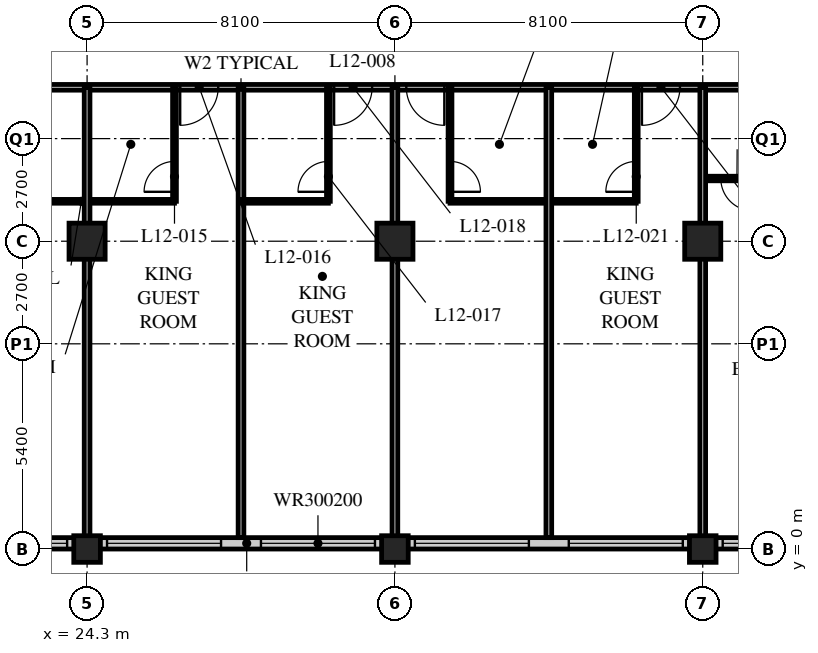
"""IFC4 building model, lengths in metres.
Left out: names, types, materials, properties, quantities, classifications, styles, units other than length and angle.
Written with IfcOpenShell. Run it as: python <this file> out.ifc"""

import sys

from ifc_helpers import new_model, si_unit, direction, frame, frame_2d, origin, origin_2d, place, context, subcontext, project, spatial, rectangle, hollow_rectangle, extrude, element, fill, save


model = new_model("IFC4")
c1 = context("Model", 3, precision=1e-05, world=origin(), true_north=direction((0.0, 1.0)))
c2 = subcontext(c1, "Body", "Model", "MODEL_VIEW")
j1 = project(units=[si_unit("LENGTHUNIT", "METRE"), si_unit("PLANEANGLEUNIT", "RADIAN")], contexts=[c1])
p1 = place(None, origin())
s1 = spatial("IfcSite", under=j1, at=p1, CompositionType="ELEMENT")
p2 = place(p1, origin())
s2 = spatial("IfcBuilding", under=s1, at=p2, CompositionType="ELEMENT")
p3 = place(p2, frame((0.0, 0.0, 53.4)))
s3 = spatial("IfcBuildingStorey", under=s2, at=p3, CompositionType="ELEMENT", Elevation=53.4)
p4 = place(p3, frame((24.3, 0.0, 0.0), z_axis=(0.0, 0.0, 1.0), x_axis=(1.0, 0.0, 0.0)))
e1 = element("IfcColumn", 1, at=p4, inside=s3, PredefinedType="COLUMN", context=c2, shape_type="SweptSolid", body=[
    extrude(hollow_rectangle(XDim=0.7, YDim=0.7, WallThickness=0.06, at=origin_2d()), origin(), (0.0, 0.0, 1.0), 3.4),
])
p5 = place(p3, frame((24.3, 8.1, 0.0), z_axis=(0.0, 0.0, 1.0), x_axis=(1.0, 0.0, 0.0)))
e2 = element("IfcColumn", 2, at=p5, inside=s3, PredefinedType="COLUMN", context=c2, shape_type="SweptSolid", body=[
    extrude(hollow_rectangle(XDim=0.95, YDim=0.95, WallThickness=0.095, at=origin_2d()), origin(), (0.0, 0.0, 1.0), 3.4),
])
p6 = place(p3, frame((32.4, 0.0, 0.0), z_axis=(0.0, 0.0, 1.0), x_axis=(1.0, 0.0, 0.0)))
e3 = element("IfcColumn", 3, at=p6, inside=s3, PredefinedType="COLUMN", context=c2, shape_type="SweptSolid", body=[
    extrude(hollow_rectangle(XDim=0.7, YDim=0.7, WallThickness=0.06, at=origin_2d()), origin(), (0.0, 0.0, 1.0), 3.4),
])
p7 = place(p3, frame((32.4, 8.1, 0.0), z_axis=(0.0, 0.0, 1.0), x_axis=(1.0, 0.0, 0.0)))
e4 = element("IfcColumn", 4, at=p7, inside=s3, PredefinedType="COLUMN", context=c2, shape_type="SweptSolid", body=[
    extrude(hollow_rectangle(XDim=0.95, YDim=0.95, WallThickness=0.095, at=origin_2d()), origin(), (0.0, 0.0, 1.0), 3.4),
])
p8 = place(p3, frame((40.5, 0.0, 0.0), z_axis=(0.0, 0.0, 1.0), x_axis=(1.0, 0.0, 0.0)))
e5 = element("IfcColumn", 5, at=p8, inside=s3, PredefinedType="COLUMN", context=c2, shape_type="SweptSolid", body=[
    extrude(hollow_rectangle(XDim=0.7, YDim=0.7, WallThickness=0.06, at=origin_2d()), origin(), (0.0, 0.0, 1.0), 3.4),
])
p9 = place(p3, frame((40.5, 8.1, 0.0), z_axis=(0.0, 0.0, 1.0), x_axis=(1.0, 0.0, 0.0)))
e6 = element("IfcColumn", 6, at=p9, inside=s3, PredefinedType="COLUMN", context=c2, shape_type="SweptSolid", body=[
    extrude(hollow_rectangle(XDim=0.95, YDim=0.95, WallThickness=0.095, at=origin_2d()), origin(), (0.0, 0.0, 1.0), 3.4),
])
p10 = place(p3, frame((8.4, 0.15, 0.0), z_axis=(0.0, 0.0, 1.0), x_axis=(1.0, 0.0, 0.0)))
e7 = element("IfcWall", 7, at=p10, inside=s3, PredefinedType="SOLIDWALL", context=c2, shape_type="SweptSolid", body=[
    extrude(rectangle(XDim=40.2, YDim=0.3, at=frame_2d((20.1, 0.0))), origin(), (0.0, 0.0, 1.0), 3.19),
])
p11 = place(p10, frame((0.225, 0.0, 0.9)))
e8 = element("IfcOpeningElement", 8, at=p11, cuts=e7, PredefinedType="OPENING", context=c2, shape_type="SweptSolid", body=[
    extrude(rectangle(XDim=3.0, YDim=2.0, at=frame_2d((1.5, 1.0))), frame((0.0, 0.16, 0.0), z_axis=(0.0, -1.0, 0.0), x_axis=(1.0, 0.0, 0.0)), (0.0, 0.0, 1.0), 0.32),
])
p12 = place(p10, frame((4.275, 0.0, 0.9)))
e9 = element("IfcOpeningElement", 9, at=p12, cuts=e7, PredefinedType="OPENING", context=c2, shape_type="SweptSolid", body=[
    extrude(rectangle(XDim=3.0, YDim=2.0, at=frame_2d((1.5, 1.0))), frame((0.0, 0.16, 0.0), z_axis=(0.0, -1.0, 0.0), x_axis=(1.0, 0.0, 0.0)), (0.0, 0.0, 1.0), 0.32),
])
p13 = place(p10, frame((8.325, 0.0, 0.9)))
e10 = element("IfcOpeningElement", 10, at=p13, cuts=e7, PredefinedType="OPENING", context=c2, shape_type="SweptSolid", body=[
    extrude(rectangle(XDim=3.0, YDim=2.0, at=frame_2d((1.5, 1.0))), frame((0.0, 0.16, 0.0), z_axis=(0.0, -1.0, 0.0), x_axis=(1.0, 0.0, 0.0)), (0.0, 0.0, 1.0), 0.32),
])
p14 = place(p10, frame((12.375, 0.0, 0.9)))
e11 = element("IfcOpeningElement", 11, at=p14, cuts=e7, PredefinedType="OPENING", context=c2, shape_type="SweptSolid", body=[
    extrude(rectangle(XDim=3.0, YDim=2.0, at=frame_2d((1.5, 1.0))), frame((0.0, 0.16, 0.0), z_axis=(0.0, -1.0, 0.0), x_axis=(1.0, 0.0, 0.0)), (0.0, 0.0, 1.0), 0.32),
])
p15 = place(p10, frame((16.425, 0.0, 0.9)))
e12 = element("IfcOpeningElement", 12, at=p15, cuts=e7, PredefinedType="OPENING", context=c2, shape_type="SweptSolid", body=[
    extrude(rectangle(XDim=3.0, YDim=2.0, at=frame_2d((1.5, 1.0))), frame((0.0, 0.16, 0.0), z_axis=(0.0, -1.0, 0.0), x_axis=(1.0, 0.0, 0.0)), (0.0, 0.0, 1.0), 0.32),
])
p16 = place(p10, frame((20.475, 0.0, 0.9)))
e13 = element("IfcOpeningElement", 13, at=p16, cuts=e7, PredefinedType="OPENING", context=c2, shape_type="SweptSolid", body=[
    extrude(rectangle(XDim=3.0, YDim=2.0, at=frame_2d((1.5, 1.0))), frame((0.0, 0.16, 0.0), z_axis=(0.0, -1.0, 0.0), x_axis=(1.0, 0.0, 0.0)), (0.0, 0.0, 1.0), 0.32),
])
p17 = place(p10, frame((24.525, 0.0, 0.9)))
e14 = element("IfcOpeningElement", 14, at=p17, cuts=e7, PredefinedType="OPENING", context=c2, shape_type="SweptSolid", body=[
    extrude(rectangle(XDim=3.0, YDim=2.0, at=frame_2d((1.5, 1.0))), frame((0.0, 0.16, 0.0), z_axis=(0.0, -1.0, 0.0), x_axis=(1.0, 0.0, 0.0)), (0.0, 0.0, 1.0), 0.32),
])
p18 = place(p10, frame((28.575, 0.0, 0.9)))
e15 = element("IfcOpeningElement", 15, at=p18, cuts=e7, PredefinedType="OPENING", context=c2, shape_type="SweptSolid", body=[
    extrude(rectangle(XDim=3.0, YDim=2.0, at=frame_2d((1.5, 1.0))), frame((0.0, 0.16, 0.0), z_axis=(0.0, -1.0, 0.0), x_axis=(1.0, 0.0, 0.0)), (0.0, 0.0, 1.0), 0.32),
])
p19 = place(p10, frame((32.625, 0.0, 0.9)))
e16 = element("IfcOpeningElement", 16, at=p19, cuts=e7, PredefinedType="OPENING", context=c2, shape_type="SweptSolid", body=[
    extrude(rectangle(XDim=3.0, YDim=2.0, at=frame_2d((1.5, 1.0))), frame((0.0, 0.16, 0.0), z_axis=(0.0, -1.0, 0.0), x_axis=(1.0, 0.0, 0.0)), (0.0, 0.0, 1.0), 0.32),
])
p20 = place(p10, frame((36.675, 0.0, 0.9)))
e17 = element("IfcOpeningElement", 17, at=p20, cuts=e7, PredefinedType="OPENING", context=c2, shape_type="SweptSolid", body=[
    extrude(rectangle(XDim=3.0, YDim=2.0, at=frame_2d((1.5, 1.0))), frame((0.0, 0.16, 0.0), z_axis=(0.0, -1.0, 0.0), x_axis=(1.0, 0.0, 0.0)), (0.0, 0.0, 1.0), 0.32),
])
p21 = place(p3, frame((12.15, 12.15, 0.0), z_axis=(0.0, 0.0, 1.0), x_axis=(1.0, 0.0, 0.0)))
e18 = element("IfcWall", 18, at=p21, inside=s3, PredefinedType="PARTITIONING", context=c2, shape_type="SweptSolid", body=[
    extrude(rectangle(XDim=32.4, YDim=0.15, at=frame_2d((16.2, 0.0))), origin(), (0.0, 0.0, 1.0), 3.19),
])
p22 = place(p21, frame((6.5, 0.0, 0.0)))
e19 = element("IfcOpeningElement", 19, at=p22, cuts=e18, PredefinedType="OPENING", context=c2, shape_type="SweptSolid", body=[
    extrude(rectangle(XDim=1.0, YDim=2.1, at=frame_2d((0.5, 1.05))), frame((0.0, 0.085, 0.0), z_axis=(0.0, -1.0, 0.0), x_axis=(1.0, 0.0, 0.0)), (0.0, 0.0, 1.0), 0.17),
])
p23 = place(p21, frame((8.4, 0.0, 0.0)))
e20 = element("IfcOpeningElement", 20, at=p23, cuts=e18, PredefinedType="OPENING", context=c2, shape_type="SweptSolid", body=[
    extrude(rectangle(XDim=1.0, YDim=2.1, at=frame_2d((0.5, 1.05))), frame((0.0, 0.085, 0.0), z_axis=(0.0, -1.0, 0.0), x_axis=(1.0, 0.0, 0.0)), (0.0, 0.0, 1.0), 0.17),
])
p24 = place(p21, frame((14.6, 0.0, 0.0)))
e21 = element("IfcOpeningElement", 21, at=p24, cuts=e18, PredefinedType="OPENING", context=c2, shape_type="SweptSolid", body=[
    extrude(rectangle(XDim=1.0, YDim=2.1, at=frame_2d((0.5, 1.05))), frame((0.0, 0.085, 0.0), z_axis=(0.0, -1.0, 0.0), x_axis=(1.0, 0.0, 0.0)), (0.0, 0.0, 1.0), 0.17),
])
p25 = place(p21, frame((18.65, 0.0, 0.0)))
e22 = element("IfcOpeningElement", 22, at=p25, cuts=e18, PredefinedType="OPENING", context=c2, shape_type="SweptSolid", body=[
    extrude(rectangle(XDim=1.0, YDim=2.1, at=frame_2d((0.5, 1.05))), frame((0.0, 0.085, 0.0), z_axis=(0.0, -1.0, 0.0), x_axis=(1.0, 0.0, 0.0)), (0.0, 0.0, 1.0), 0.17),
])
p26 = place(p21, frame((20.55, 0.0, 0.0)))
e23 = element("IfcOpeningElement", 23, at=p26, cuts=e18, PredefinedType="OPENING", context=c2, shape_type="SweptSolid", body=[
    extrude(rectangle(XDim=1.0, YDim=2.1, at=frame_2d((0.5, 1.05))), frame((0.0, 0.085, 0.0), z_axis=(0.0, -1.0, 0.0), x_axis=(1.0, 0.0, 0.0)), (0.0, 0.0, 1.0), 0.17),
])
p27 = place(p21, frame((26.75, 0.0, 0.0)))
e24 = element("IfcOpeningElement", 24, at=p27, cuts=e18, PredefinedType="OPENING", context=c2, shape_type="SweptSolid", body=[
    extrude(rectangle(XDim=1.0, YDim=2.1, at=frame_2d((0.5, 1.05))), frame((0.0, 0.085, 0.0), z_axis=(0.0, -1.0, 0.0), x_axis=(1.0, 0.0, 0.0)), (0.0, 0.0, 1.0), 0.17),
])
p28 = place(p21, frame((1.525, 0.0, 0.0)))
e25 = element("IfcOpeningElement", 25, at=p28, cuts=e18, PredefinedType="OPENING", context=c2, shape_type="SweptSolid", body=[
    extrude(rectangle(XDim=1.0, YDim=2.1, at=frame_2d((0.5, 1.05))), frame((0.0, 0.085, 0.0), z_axis=(0.0, -1.0, 0.0), x_axis=(1.0, 0.0, 0.0)), (0.0, 0.0, 1.0), 0.17),
])
p29 = place(p21, frame((29.875, 0.0, 0.0)))
e26 = element("IfcOpeningElement", 26, at=p29, cuts=e18, PredefinedType="OPENING", context=c2, shape_type="SweptSolid", body=[
    extrude(rectangle(XDim=1.0, YDim=2.1, at=frame_2d((0.5, 1.05))), frame((0.0, 0.085, 0.0), z_axis=(0.0, -1.0, 0.0), x_axis=(1.0, 0.0, 0.0)), (0.0, 0.0, 1.0), 0.17),
])
p30 = place(p3, frame((21.7, 9.15, 0.0), z_axis=(0.0, 0.0, 1.0), x_axis=(1.0, 0.0, 0.0)))
e27 = element("IfcWall", 27, at=p30, inside=s3, PredefinedType="PARTITIONING", context=c2, shape_type="SweptSolid", body=[
    extrude(rectangle(XDim=4.9, YDim=0.1, at=frame_2d((2.45, 0.0))), origin(), (0.0, 0.0, 1.0), 3.19),
])
p31 = place(p3, frame((24.3, 12.15, 0.0), z_axis=(0.0, 0.0, 1.0), x_axis=(0.0, -1.0, 0.0)))
e28 = element("IfcWall", 28, at=p31, inside=s3, PredefinedType="PARTITIONING", context=c2, shape_type="SweptSolid", body=[
    extrude(rectangle(XDim=11.85, YDim=0.15, at=frame_2d((5.925, 0.0))), origin(), (0.0, 0.0, 1.0), 2.578),
])
p32 = place(p3, frame((26.6, 12.15, 0.0), z_axis=(0.0, 0.0, 1.0), x_axis=(0.0, -1.0, 0.0)))
e29 = element("IfcWall", 29, at=p32, inside=s3, PredefinedType="PARTITIONING", context=c2, shape_type="SweptSolid", body=[
    extrude(rectangle(XDim=3.0, YDim=0.1, at=frame_2d((1.5, 0.0))), origin(), (0.0, 0.0, 1.0), 3.19),
])
p33 = place(p32, frame((1.95, 0.0, 0.0)))
e30 = element("IfcOpeningElement", 30, at=p33, cuts=e29, PredefinedType="OPENING", context=c2, shape_type="SweptSolid", body=[
    extrude(rectangle(XDim=0.8, YDim=2.1, at=frame_2d((0.4, 1.05))), frame((0.0, 0.06, 0.0), z_axis=(0.0, -1.0, 0.0), x_axis=(1.0, 0.0, 0.0)), (0.0, 0.0, 1.0), 0.12),
])
p34 = place(p3, frame((28.35, 12.15, 0.0), z_axis=(0.0, 0.0, 1.0), x_axis=(0.0, -1.0, 0.0)))
e31 = element("IfcWall", 31, at=p34, inside=s3, PredefinedType="PARTITIONING", context=c2, shape_type="SweptSolid", body=[
    extrude(rectangle(XDim=11.85, YDim=0.15, at=frame_2d((5.925, 0.0))), origin(), (0.0, 0.0, 1.0), 3.19),
])
p35 = place(p3, frame((28.35, 9.15, 0.0), z_axis=(0.0, 0.0, 1.0), x_axis=(1.0, 0.0, 0.0)))
e32 = element("IfcWall", 32, at=p35, inside=s3, PredefinedType="PARTITIONING", context=c2, shape_type="SweptSolid", body=[
    extrude(rectangle(XDim=2.3, YDim=0.1, at=frame_2d((1.15, 0.0))), origin(), (0.0, 0.0, 1.0), 3.19),
])
p36 = place(p3, frame((30.65, 12.15, 0.0), z_axis=(0.0, 0.0, 1.0), x_axis=(0.0, -1.0, 0.0)))
e33 = element("IfcWall", 33, at=p36, inside=s3, PredefinedType="PARTITIONING", context=c2, shape_type="SweptSolid", body=[
    extrude(rectangle(XDim=3.0, YDim=0.1, at=frame_2d((1.5, 0.0))), origin(), (0.0, 0.0, 1.0), 3.19),
])
p37 = place(p36, frame((1.95, 0.0, 0.0)))
e34 = element("IfcOpeningElement", 34, at=p37, cuts=e33, PredefinedType="OPENING", context=c2, shape_type="SweptSolid", body=[
    extrude(rectangle(XDim=0.8, YDim=2.1, at=frame_2d((0.4, 1.05))), frame((0.0, 0.06, 0.0), z_axis=(0.0, -1.0, 0.0), x_axis=(1.0, 0.0, 0.0)), (0.0, 0.0, 1.0), 0.12),
])
p38 = place(p3, frame((32.4, 12.15, 0.0), z_axis=(0.0, 0.0, 1.0), x_axis=(0.0, -1.0, 0.0)))
e35 = element("IfcWall", 35, at=p38, inside=s3, PredefinedType="PARTITIONING", context=c2, shape_type="SweptSolid", body=[
    extrude(rectangle(XDim=11.85, YDim=0.15, at=frame_2d((5.925, 0.0))), origin(), (0.0, 0.0, 1.0), 2.578),
])
p39 = place(p3, frame((33.85, 9.15, 0.0), z_axis=(0.0, 0.0, 1.0), x_axis=(1.0, 0.0, 0.0)))
e36 = element("IfcWall", 36, at=p39, inside=s3, PredefinedType="PARTITIONING", context=c2, shape_type="SweptSolid", body=[
    extrude(rectangle(XDim=4.9, YDim=0.1, at=frame_2d((2.45, 0.0))), origin(), (0.0, 0.0, 1.0), 3.19),
])
p40 = place(p3, frame((33.85, 12.15, 0.0), z_axis=(0.0, 0.0, 1.0), x_axis=(0.0, -1.0, 0.0)))
e37 = element("IfcWall", 37, at=p40, inside=s3, PredefinedType="PARTITIONING", context=c2, shape_type="SweptSolid", body=[
    extrude(rectangle(XDim=3.0, YDim=0.1, at=frame_2d((1.5, 0.0))), origin(), (0.0, 0.0, 1.0), 3.19),
])
p41 = place(p40, frame((1.95, 0.0, 0.0)))
e38 = element("IfcOpeningElement", 38, at=p41, cuts=e37, PredefinedType="OPENING", context=c2, shape_type="SweptSolid", body=[
    extrude(rectangle(XDim=0.8, YDim=2.1, at=frame_2d((0.4, 1.05))), frame((0.0, 0.06, 0.0), z_axis=(0.0, -1.0, 0.0), x_axis=(1.0, 0.0, 0.0)), (0.0, 0.0, 1.0), 0.12),
])
p42 = place(p3, frame((36.45, 12.15, 0.0), z_axis=(0.0, 0.0, 1.0), x_axis=(0.0, -1.0, 0.0)))
e39 = element("IfcWall", 39, at=p42, inside=s3, PredefinedType="PARTITIONING", context=c2, shape_type="SweptSolid", body=[
    extrude(rectangle(XDim=11.85, YDim=0.15, at=frame_2d((5.925, 0.0))), origin(), (0.0, 0.0, 1.0), 3.19),
])
p43 = place(p3, frame((38.75, 12.15, 0.0), z_axis=(0.0, 0.0, 1.0), x_axis=(0.0, -1.0, 0.0)))
e40 = element("IfcWall", 40, at=p43, inside=s3, PredefinedType="PARTITIONING", context=c2, shape_type="SweptSolid", body=[
    extrude(rectangle(XDim=3.0, YDim=0.1, at=frame_2d((1.5, 0.0))), origin(), (0.0, 0.0, 1.0), 3.19),
])
p44 = place(p43, frame((1.95, 0.0, 0.0)))
e41 = element("IfcOpeningElement", 41, at=p44, cuts=e40, PredefinedType="OPENING", context=c2, shape_type="SweptSolid", body=[
    extrude(rectangle(XDim=0.8, YDim=2.1, at=frame_2d((0.4, 1.05))), frame((0.0, 0.06, 0.0), z_axis=(0.0, -1.0, 0.0), x_axis=(1.0, 0.0, 0.0)), (0.0, 0.0, 1.0), 0.12),
])
p45 = place(p3, frame((40.5, 9.75, 0.0), z_axis=(0.0, 0.0, 1.0), x_axis=(1.0, 0.0, 0.0)))
e42 = element("IfcWall", 42, at=p45, inside=s3, PredefinedType="PARTITIONING", context=c2, shape_type="SweptSolid", body=[
    extrude(rectangle(XDim=8.05, YDim=0.12, at=frame_2d((4.025, 0.0))), origin(), (0.0, 0.0, 1.0), 3.19),
])
p46 = place(p45, frame((0.475, 0.0, 0.0)))
e43 = element("IfcOpeningElement", 43, at=p46, cuts=e42, PredefinedType="OPENING", context=c2, shape_type="SweptSolid", body=[
    extrude(rectangle(XDim=0.85, YDim=2.1, at=frame_2d((0.425, 1.05))), frame((0.0, 0.07, 0.0), z_axis=(0.0, -1.0, 0.0), x_axis=(1.0, 0.0, 0.0)), (0.0, 0.0, 1.0), 0.14),
])
p47 = place(p45, frame((4.325, 0.0, 0.0)))
e44 = element("IfcOpeningElement", 44, at=p47, cuts=e42, PredefinedType="OPENING", context=c2, shape_type="SweptSolid", body=[
    extrude(rectangle(XDim=0.85, YDim=2.1, at=frame_2d((0.425, 1.05))), frame((0.0, 0.07, 0.0), z_axis=(0.0, -1.0, 0.0), x_axis=(1.0, 0.0, 0.0)), (0.0, 0.0, 1.0), 0.14),
])
p48 = place(p3, frame((40.5, 12.15, 0.0), z_axis=(0.0, 0.0, 1.0), x_axis=(0.0, -1.0, 0.0)))
e45 = element("IfcWall", 45, at=p48, inside=s3, PredefinedType="PARTITIONING", context=c2, shape_type="SweptSolid", body=[
    extrude(rectangle(XDim=11.85, YDim=0.15, at=frame_2d((5.925, 0.0))), origin(), (0.0, 0.0, 1.0), 2.578),
])
p49 = place(p14, origin())
e46 = element("IfcWindow", 46, at=p49, inside=s3, PartitioningType="SINGLE_PANEL", PredefinedType="WINDOW", context=c2, shape_type="SweptSolid", body=[
    extrude(rectangle(XDim=3.0, YDim=2.0, at=frame_2d((1.5, 1.0))), frame((0.0, 0.03, 0.0), z_axis=(0.0, -1.0, 0.0), x_axis=(1.0, 0.0, 0.0)), (0.0, 0.0, 1.0), 0.06),
])
fill(e11, e46)
p50 = place(p15, origin())
e47 = element("IfcWindow", 47, at=p50, inside=s3, PartitioningType="SINGLE_PANEL", PredefinedType="WINDOW", context=c2, shape_type="SweptSolid", body=[
    extrude(rectangle(XDim=3.0, YDim=2.0, at=frame_2d((1.5, 1.0))), frame((0.0, 0.03, 0.0), z_axis=(0.0, -1.0, 0.0), x_axis=(1.0, 0.0, 0.0)), (0.0, 0.0, 1.0), 0.06),
])
fill(e12, e47)
p51 = place(p16, origin())
e48 = element("IfcWindow", 48, at=p51, inside=s3, PartitioningType="SINGLE_PANEL", PredefinedType="WINDOW", context=c2, shape_type="SweptSolid", body=[
    extrude(rectangle(XDim=3.0, YDim=2.0, at=frame_2d((1.5, 1.0))), frame((0.0, 0.03, 0.0), z_axis=(0.0, -1.0, 0.0), x_axis=(1.0, 0.0, 0.0)), (0.0, 0.0, 1.0), 0.06),
])
fill(e13, e48)
p52 = place(p17, origin())
e49 = element("IfcWindow", 49, at=p52, inside=s3, PartitioningType="SINGLE_PANEL", PredefinedType="WINDOW", context=c2, shape_type="SweptSolid", body=[
    extrude(rectangle(XDim=3.0, YDim=2.0, at=frame_2d((1.5, 1.0))), frame((0.0, 0.03, 0.0), z_axis=(0.0, -1.0, 0.0), x_axis=(1.0, 0.0, 0.0)), (0.0, 0.0, 1.0), 0.06),
])
fill(e14, e49)
p53 = place(p18, origin())
e50 = element("IfcWindow", 50, at=p53, inside=s3, PartitioningType="SINGLE_PANEL", PredefinedType="WINDOW", context=c2, shape_type="SweptSolid", body=[
    extrude(rectangle(XDim=3.0, YDim=2.0, at=frame_2d((1.5, 1.0))), frame((0.0, 0.03, 0.0), z_axis=(0.0, -1.0, 0.0), x_axis=(1.0, 0.0, 0.0)), (0.0, 0.0, 1.0), 0.06),
])
fill(e15, e50)
p54 = place(p19, origin())
e51 = element("IfcWindow", 51, at=p54, inside=s3, PartitioningType="SINGLE_PANEL", PredefinedType="WINDOW", context=c2, shape_type="SweptSolid", body=[
    extrude(rectangle(XDim=3.0, YDim=2.0, at=frame_2d((1.5, 1.0))), frame((0.0, 0.03, 0.0), z_axis=(0.0, -1.0, 0.0), x_axis=(1.0, 0.0, 0.0)), (0.0, 0.0, 1.0), 0.06),
])
fill(e16, e51)
p55 = place(p33, origin())
e52 = element("IfcDoor", 52, at=p55, inside=s3, OperationType="SINGLE_SWING_LEFT", PredefinedType="DOOR", context=c2, shape_type="SweptSolid", body=[
    extrude(rectangle(XDim=0.8, YDim=2.1, at=frame_2d((0.4, 1.05))), frame((0.0, 0.025, 0.0), z_axis=(0.0, -1.0, 0.0), x_axis=(1.0, 0.0, 0.0)), (0.0, 0.0, 1.0), 0.05),
])
fill(e30, e52)
p56 = place(p24, origin())
e53 = element("IfcDoor", 53, at=p56, inside=s3, OperationType="SINGLE_SWING_RIGHT", PredefinedType="DOOR", context=c2, shape_type="SweptSolid", body=[
    extrude(rectangle(XDim=1.0, YDim=2.1, at=frame_2d((0.5, 1.05))), frame((0.0, 0.025, 0.0), z_axis=(0.0, -1.0, 0.0), x_axis=(1.0, 0.0, 0.0)), (0.0, 0.0, 1.0), 0.05),
])
fill(e21, e53)
p57 = place(p37, origin())
e54 = element("IfcDoor", 54, at=p57, inside=s3, OperationType="SINGLE_SWING_LEFT", PredefinedType="DOOR", context=c2, shape_type="SweptSolid", body=[
    extrude(rectangle(XDim=0.8, YDim=2.1, at=frame_2d((0.4, 1.05))), frame((0.0, 0.025, 0.0), z_axis=(0.0, -1.0, 0.0), x_axis=(1.0, 0.0, 0.0)), (0.0, 0.0, 1.0), 0.05),
])
fill(e34, e54)
p58 = place(p25, origin())
e55 = element("IfcDoor", 55, at=p58, inside=s3, OperationType="SINGLE_SWING_RIGHT", PredefinedType="DOOR", context=c2, shape_type="SweptSolid", body=[
    extrude(rectangle(XDim=1.0, YDim=2.1, at=frame_2d((0.5, 1.05))), frame((0.0, 0.025, 0.0), z_axis=(0.0, -1.0, 0.0), x_axis=(1.0, 0.0, 0.0)), (0.0, 0.0, 1.0), 0.05),
])
fill(e22, e55)
p59 = place(p41, origin())
e56 = element("IfcDoor", 56, at=p59, inside=s3, OperationType="SINGLE_SWING_RIGHT", PredefinedType="DOOR", context=c2, shape_type="SweptSolid", body=[
    extrude(rectangle(XDim=0.8, YDim=2.1, at=frame_2d((0.4, 1.05))), frame((0.0, 0.025, 0.0), z_axis=(0.0, -1.0, 0.0), x_axis=(1.0, 0.0, 0.0)), (0.0, 0.0, 1.0), 0.05),
])
fill(e38, e56)
p60 = place(p26, origin())
e57 = element("IfcDoor", 57, at=p60, inside=s3, OperationType="SINGLE_SWING_LEFT", PredefinedType="DOOR", context=c2, shape_type="SweptSolid", body=[
    extrude(rectangle(XDim=1.0, YDim=2.1, at=frame_2d((0.5, 1.05))), frame((0.0, 0.025, 0.0), z_axis=(0.0, -1.0, 0.0), x_axis=(1.0, 0.0, 0.0)), (0.0, 0.0, 1.0), 0.05),
])
fill(e23, e57)
p61 = place(p44, origin())
e58 = element("IfcDoor", 58, at=p61, inside=s3, OperationType="SINGLE_SWING_LEFT", PredefinedType="DOOR", context=c2, shape_type="SweptSolid", body=[
    extrude(rectangle(XDim=0.8, YDim=2.1, at=frame_2d((0.4, 1.05))), frame((0.0, 0.025, 0.0), z_axis=(0.0, -1.0, 0.0), x_axis=(1.0, 0.0, 0.0)), (0.0, 0.0, 1.0), 0.05),
])
fill(e41, e58)
p62 = place(p27, origin())
e59 = element("IfcDoor", 59, at=p62, inside=s3, OperationType="SINGLE_SWING_RIGHT", PredefinedType="DOOR", context=c2, shape_type="SweptSolid", body=[
    extrude(rectangle(XDim=1.0, YDim=2.1, at=frame_2d((0.5, 1.05))), frame((0.0, 0.025, 0.0), z_axis=(0.0, -1.0, 0.0), x_axis=(1.0, 0.0, 0.0)), (0.0, 0.0, 1.0), 0.05),
])
fill(e24, e59)
p63 = place(p46, origin())
e60 = element("IfcDoor", 60, at=p63, inside=s3, OperationType="SINGLE_SWING_LEFT", PredefinedType="DOOR", context=c2, shape_type="SweptSolid", body=[
    extrude(rectangle(XDim=0.85, YDim=2.1, at=frame_2d((0.425, 1.05))), frame((0.0, 0.025, 0.0), z_axis=(0.0, -1.0, 0.0), x_axis=(1.0, 0.0, 0.0)), (0.0, 0.0, 1.0), 0.05),
])
fill(e43, e60)
save(model, sys.argv[1])
